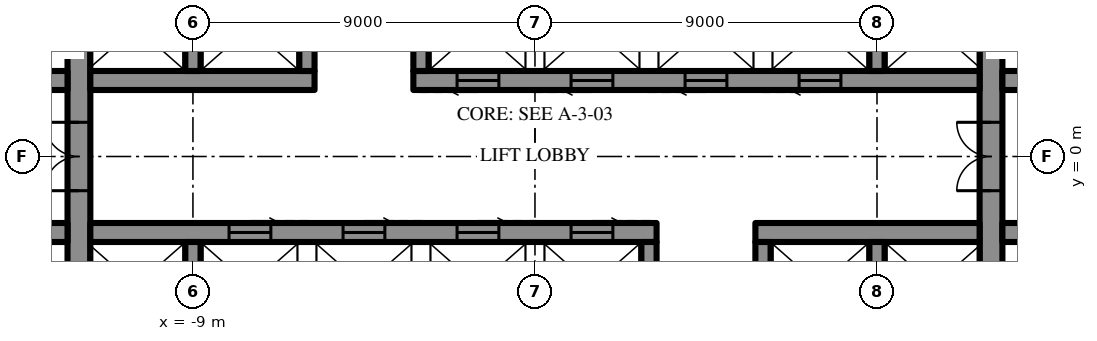
"""IFC4 building model, lengths in metres.
Left out: names, types, materials, properties, quantities, classifications, styles, units other than length and angle.
Written with IfcOpenShell. Run it as: python <this file> out.ifc"""

import sys

from ifc_helpers import new_model, si_unit, direction, frame, frame_2d, origin, place, context, subcontext, project, spatial, rectangle, extrude, element, fill, save


model = new_model("IFC4")
c1 = context("Model", 3, precision=1e-05, world=origin(), true_north=direction((0.0, 1.0)))
c2 = subcontext(c1, "Body", "Model", "MODEL_VIEW")
j1 = project(units=[si_unit("LENGTHUNIT", "METRE"), si_unit("PLANEANGLEUNIT", "RADIAN")], contexts=[c1])
p1 = place(None, origin())
s1 = spatial("IfcSite", under=j1, at=p1, CompositionType="ELEMENT")
p2 = place(p1, origin())
s2 = spatial("IfcBuilding", under=s1, at=p2, CompositionType="ELEMENT")
p3 = place(p2, frame((0.0, 0.0, 274.3)))
s3 = spatial("IfcBuildingStorey", under=s2, at=p3, CompositionType="ELEMENT", Elevation=274.3)
p4 = place(p3, frame((12.0, -10.7, 0.0), z_axis=(0.0, 0.0, 1.0), x_axis=(0.0, 1.0, 0.0)))
e1 = element("IfcWall", 1, at=p4, inside=s3, PredefinedType="SHEAR", context=c2, shape_type="SweptSolid", body=[
    extrude(rectangle(XDim=21.4, YDim=0.6, at=frame_2d((10.7, 0.0))), origin(), (0.0, 0.0, 1.0), 4.2),
])
p5 = place(p4, frame((9.8, 0.0, 0.0)))
e2 = element("IfcOpeningElement", 2, at=p5, cuts=e1, PredefinedType="OPENING", context=c2, shape_type="SweptSolid", body=[
    extrude(rectangle(XDim=1.8, YDim=2.4, at=frame_2d((0.9, 1.2))), frame((0.0, 0.31, 0.0), z_axis=(0.0, -1.0, 0.0), x_axis=(1.0, 0.0, 0.0)), (0.0, 0.0, 1.0), 0.62),
])
p6 = place(p3, frame((-12.0, -10.7, 0.0), z_axis=(0.0, 0.0, 1.0), x_axis=(0.0, 1.0, 0.0)))
e3 = element("IfcWall", 3, at=p6, inside=s3, PredefinedType="SHEAR", context=c2, shape_type="SweptSolid", body=[
    extrude(rectangle(XDim=21.4, YDim=0.6, at=frame_2d((10.7, 0.0))), origin(), (0.0, 0.0, 1.0), 4.2),
])
p7 = place(p6, frame((9.8, 0.0, 0.0)))
e4 = element("IfcOpeningElement", 4, at=p7, cuts=e3, PredefinedType="OPENING", context=c2, shape_type="SweptSolid", body=[
    extrude(rectangle(XDim=1.8, YDim=2.4, at=frame_2d((0.9, 1.2))), frame((0.0, 0.31, 0.0), z_axis=(0.0, -1.0, 0.0), x_axis=(1.0, 0.0, 0.0)), (0.0, 0.0, 1.0), 0.62),
])
p8 = place(p3, frame((-14.5, 2.0, 0.0), z_axis=(0.0, 0.0, 1.0), x_axis=(1.0, 0.0, 0.0)))
e5 = element("IfcWall", 5, at=p8, inside=s3, PredefinedType="SHEAR", context=c2, shape_type="SweptSolid", body=[
    extrude(rectangle(XDim=2.2, YDim=0.5, at=frame_2d((1.1, 0.0))), origin(), (0.0, 0.0, 1.0), 4.2),
])
p9 = place(p8, frame((0.5, 0.0, 0.0)))
e6 = element("IfcOpeningElement", 6, at=p9, cuts=e5, PredefinedType="OPENING", context=c2, shape_type="SweptSolid", body=[
    extrude(rectangle(XDim=0.9, YDim=2.2, at=frame_2d((0.45, 1.1))), frame((0.0, 0.26, 0.0), z_axis=(0.0, -1.0, 0.0), x_axis=(1.0, 0.0, 0.0)), (0.0, 0.0, 1.0), 0.52),
])
p10 = place(p3, frame((-11.7, 2.0, 0.0), z_axis=(0.0, 0.0, 1.0), x_axis=(1.0, 0.0, 0.0)))
e7 = element("IfcWall", 7, at=p10, inside=s3, PredefinedType="SHEAR", context=c2, shape_type="SweptSolid", body=[
    extrude(rectangle(XDim=5.9, YDim=0.5, at=frame_2d((2.95, 0.0))), origin(), (0.0, 0.0, 1.0), 4.2),
])
p11 = place(p3, frame((-3.2, 2.0, 0.0), z_axis=(0.0, 0.0, 1.0), x_axis=(1.0, 0.0, 0.0)))
e8 = element("IfcWall", 8, at=p11, inside=s3, PredefinedType="SHEAR", context=c2, shape_type="SweptSolid", body=[
    extrude(rectangle(XDim=14.9, YDim=0.5, at=frame_2d((7.45, 0.0))), origin(), (0.0, 0.0, 1.0), 4.2),
])
p12 = place(p11, frame((1.15, 0.0, 0.0)))
e9 = element("IfcOpeningElement", 9, at=p12, cuts=e8, PredefinedType="OPENING", context=c2, shape_type="SweptSolid", body=[
    extrude(rectangle(XDim=1.1, YDim=2.2, at=frame_2d((0.55, 1.1))), frame((0.0, 0.26, 0.0), z_axis=(0.0, -1.0, 0.0), x_axis=(1.0, 0.0, 0.0)), (0.0, 0.0, 1.0), 0.52),
])
p13 = place(p11, frame((4.15, 0.0, 0.0)))
e10 = element("IfcOpeningElement", 10, at=p13, cuts=e8, PredefinedType="OPENING", context=c2, shape_type="SweptSolid", body=[
    extrude(rectangle(XDim=1.1, YDim=2.2, at=frame_2d((0.55, 1.1))), frame((0.0, 0.26, 0.0), z_axis=(0.0, -1.0, 0.0), x_axis=(1.0, 0.0, 0.0)), (0.0, 0.0, 1.0), 0.52),
])
p14 = place(p11, frame((7.15, 0.0, 0.0)))
e11 = element("IfcOpeningElement", 11, at=p14, cuts=e8, PredefinedType="OPENING", context=c2, shape_type="SweptSolid", body=[
    extrude(rectangle(XDim=1.1, YDim=2.2, at=frame_2d((0.55, 1.1))), frame((0.0, 0.26, 0.0), z_axis=(0.0, -1.0, 0.0), x_axis=(1.0, 0.0, 0.0)), (0.0, 0.0, 1.0), 0.52),
])
p15 = place(p11, frame((10.15, 0.0, 0.0)))
e12 = element("IfcOpeningElement", 12, at=p15, cuts=e8, PredefinedType="OPENING", context=c2, shape_type="SweptSolid", body=[
    extrude(rectangle(XDim=1.1, YDim=2.2, at=frame_2d((0.55, 1.1))), frame((0.0, 0.26, 0.0), z_axis=(0.0, -1.0, 0.0), x_axis=(1.0, 0.0, 0.0)), (0.0, 0.0, 1.0), 0.52),
])
p16 = place(p3, frame((12.3, 2.0, 0.0), z_axis=(0.0, 0.0, 1.0), x_axis=(1.0, 0.0, 0.0)))
e13 = element("IfcWall", 13, at=p16, inside=s3, PredefinedType="SHEAR", context=c2, shape_type="SweptSolid", body=[
    extrude(rectangle(XDim=2.2, YDim=0.5, at=frame_2d((1.1, 0.0))), origin(), (0.0, 0.0, 1.0), 4.2),
])
p17 = place(p16, frame((0.8, 0.0, 0.0)))
e14 = element("IfcOpeningElement", 14, at=p17, cuts=e13, PredefinedType="OPENING", context=c2, shape_type="SweptSolid", body=[
    extrude(rectangle(XDim=0.9, YDim=2.2, at=frame_2d((0.45, 1.1))), frame((0.0, 0.26, 0.0), z_axis=(0.0, -1.0, 0.0), x_axis=(1.0, 0.0, 0.0)), (0.0, 0.0, 1.0), 0.52),
])
for number, where, z_axis, x_axis in (
    (15, (-9.0, 2.25, 0.0), (0.0, 0.0, 1.0), (0.0, 1.0, 0.0)),
    (16, (-6.0, 2.25, 0.0), (0.0, 0.0, 1.0), (0.0, 1.0, 0.0)),
    (17, (-3.0, 2.25, 0.0), (0.0, 0.0, 1.0), (0.0, 1.0, 0.0)),
    (18, (9.0, 2.25, 0.0), (0.0, 0.0, 1.0), (0.0, 1.0, 0.0)),
):
    element("IfcWall", number, at=place(p3, frame(where, z_axis=z_axis, x_axis=x_axis)), inside=s3, PredefinedType="SHEAR", context=c2, shape_type="SweptSolid", body=[
        extrude(rectangle(XDim=2.3, YDim=0.4, at=frame_2d((1.15, 0.0))), origin(), (0.0, 0.0, 1.0), 4.2),
    ])
p18 = place(p3, frame((14.5, -2.0, 0.0), z_axis=(0.0, 0.0, 1.0), x_axis=(-1.0, 0.0, 0.0)))
e19 = element("IfcWall", 19, at=p18, inside=s3, PredefinedType="SHEAR", context=c2, shape_type="SweptSolid", body=[
    extrude(rectangle(XDim=2.2, YDim=0.5, at=frame_2d((1.1, 0.0))), origin(), (0.0, 0.0, 1.0), 4.2),
])
p19 = place(p18, frame((0.5, 0.0, 0.0)))
e20 = element("IfcOpeningElement", 20, at=p19, cuts=e19, PredefinedType="OPENING", context=c2, shape_type="SweptSolid", body=[
    extrude(rectangle(XDim=0.9, YDim=2.2, at=frame_2d((0.45, 1.1))), frame((0.0, 0.26, 0.0), z_axis=(0.0, -1.0, 0.0), x_axis=(1.0, 0.0, 0.0)), (0.0, 0.0, 1.0), 0.52),
])
p20 = place(p3, frame((11.7, -2.0, 0.0), z_axis=(0.0, 0.0, 1.0), x_axis=(-1.0, 0.0, 0.0)))
e21 = element("IfcWall", 21, at=p20, inside=s3, PredefinedType="SHEAR", context=c2, shape_type="SweptSolid", body=[
    extrude(rectangle(XDim=5.9, YDim=0.5, at=frame_2d((2.95, 0.0))), origin(), (0.0, 0.0, 1.0), 4.2),
])
p21 = place(p3, frame((3.2, -2.0, 0.0), z_axis=(0.0, 0.0, 1.0), x_axis=(-1.0, 0.0, 0.0)))
e22 = element("IfcWall", 22, at=p21, inside=s3, PredefinedType="SHEAR", context=c2, shape_type="SweptSolid", body=[
    extrude(rectangle(XDim=14.9, YDim=0.5, at=frame_2d((7.45, 0.0))), origin(), (0.0, 0.0, 1.0), 4.2),
])
p22 = place(p21, frame((1.15, 0.0, 0.0)))
e23 = element("IfcOpeningElement", 23, at=p22, cuts=e22, PredefinedType="OPENING", context=c2, shape_type="SweptSolid", body=[
    extrude(rectangle(XDim=1.1, YDim=2.2, at=frame_2d((0.55, 1.1))), frame((0.0, 0.26, 0.0), z_axis=(0.0, -1.0, 0.0), x_axis=(1.0, 0.0, 0.0)), (0.0, 0.0, 1.0), 0.52),
])
p23 = place(p21, frame((4.15, 0.0, 0.0)))
e24 = element("IfcOpeningElement", 24, at=p23, cuts=e22, PredefinedType="OPENING", context=c2, shape_type="SweptSolid", body=[
    extrude(rectangle(XDim=1.1, YDim=2.2, at=frame_2d((0.55, 1.1))), frame((0.0, 0.26, 0.0), z_axis=(0.0, -1.0, 0.0), x_axis=(1.0, 0.0, 0.0)), (0.0, 0.0, 1.0), 0.52),
])
p24 = place(p21, frame((7.15, 0.0, 0.0)))
e25 = element("IfcOpeningElement", 25, at=p24, cuts=e22, PredefinedType="OPENING", context=c2, shape_type="SweptSolid", body=[
    extrude(rectangle(XDim=1.1, YDim=2.2, at=frame_2d((0.55, 1.1))), frame((0.0, 0.26, 0.0), z_axis=(0.0, -1.0, 0.0), x_axis=(1.0, 0.0, 0.0)), (0.0, 0.0, 1.0), 0.52),
])
p25 = place(p21, frame((10.15, 0.0, 0.0)))
e26 = element("IfcOpeningElement", 26, at=p25, cuts=e22, PredefinedType="OPENING", context=c2, shape_type="SweptSolid", body=[
    extrude(rectangle(XDim=1.1, YDim=2.2, at=frame_2d((0.55, 1.1))), frame((0.0, 0.26, 0.0), z_axis=(0.0, -1.0, 0.0), x_axis=(1.0, 0.0, 0.0)), (0.0, 0.0, 1.0), 0.52),
])
p26 = place(p3, frame((-12.3, -2.0, 0.0), z_axis=(0.0, 0.0, 1.0), x_axis=(-1.0, 0.0, 0.0)))
e27 = element("IfcWall", 27, at=p26, inside=s3, PredefinedType="SHEAR", context=c2, shape_type="SweptSolid", body=[
    extrude(rectangle(XDim=2.2, YDim=0.5, at=frame_2d((1.1, 0.0))), origin(), (0.0, 0.0, 1.0), 4.2),
])
p27 = place(p26, frame((0.8, 0.0, 0.0)))
e28 = element("IfcOpeningElement", 28, at=p27, cuts=e27, PredefinedType="OPENING", context=c2, shape_type="SweptSolid", body=[
    extrude(rectangle(XDim=0.9, YDim=2.2, at=frame_2d((0.45, 1.1))), frame((0.0, 0.26, 0.0), z_axis=(0.0, -1.0, 0.0), x_axis=(1.0, 0.0, 0.0)), (0.0, 0.0, 1.0), 0.52),
])
for number, where, z_axis, x_axis in (
    (29, (9.0, -2.25, 0.0), (0.0, 0.0, 1.0), (0.0, -1.0, 0.0)),
    (30, (6.0, -2.25, 0.0), (0.0, 0.0, 1.0), (0.0, -1.0, 0.0)),
    (31, (3.0, -2.25, 0.0), (0.0, 0.0, 1.0), (0.0, -1.0, 0.0)),
    (32, (-9.0, -2.25, 0.0), (0.0, 0.0, 1.0), (0.0, -1.0, 0.0)),
):
    element("IfcWall", number, at=place(p3, frame(where, z_axis=z_axis, x_axis=x_axis)), inside=s3, PredefinedType="SHEAR", context=c2, shape_type="SweptSolid", body=[
        extrude(rectangle(XDim=2.3, YDim=0.4, at=frame_2d((1.15, 0.0))), origin(), (0.0, 0.0, 1.0), 4.2),
    ])
p28 = place(p5, origin())
e33 = element("IfcDoor", 33, at=p28, inside=s3, OperationType="DOUBLE_DOOR_SINGLE_SWING", PredefinedType="DOOR", context=c2, shape_type="SweptSolid", body=[
    extrude(rectangle(XDim=1.8, YDim=2.4, at=frame_2d((0.9, 1.2))), frame((0.0, 0.025, 0.0), z_axis=(0.0, -1.0, 0.0), x_axis=(1.0, 0.0, 0.0)), (0.0, 0.0, 1.0), 0.05),
])
fill(e2, e33)
p29 = place(p7, origin())
e34 = element("IfcDoor", 34, at=p29, inside=s3, OperationType="DOUBLE_DOOR_SINGLE_SWING", PredefinedType="DOOR", context=c2, shape_type="SweptSolid", body=[
    extrude(rectangle(XDim=1.8, YDim=2.4, at=frame_2d((0.9, 1.2))), frame((0.0, 0.025, 0.0), z_axis=(0.0, -1.0, 0.0), x_axis=(1.0, 0.0, 0.0)), (0.0, 0.0, 1.0), 0.05),
])
fill(e4, e34)
p30 = place(p12, frame((1.1, 0.0, 0.0), z_axis=(0.0, 0.0, 1.0), x_axis=(-1.0, 0.0, 0.0)))
e35 = element("IfcDoor", 35, at=p30, inside=s3, OperationType="SLIDING_TO_LEFT", PredefinedType="DOOR", context=c2, shape_type="SweptSolid", body=[
    extrude(rectangle(XDim=1.1, YDim=2.2, at=frame_2d((0.55, 1.1))), frame((0.0, 0.025, 0.0), z_axis=(0.0, -1.0, 0.0), x_axis=(1.0, 0.0, 0.0)), (0.0, 0.0, 1.0), 0.05),
])
fill(e9, e35)
p31 = place(p13, frame((1.1, 0.0, 0.0), z_axis=(0.0, 0.0, 1.0), x_axis=(-1.0, 0.0, 0.0)))
e36 = element("IfcDoor", 36, at=p31, inside=s3, OperationType="SLIDING_TO_LEFT", PredefinedType="DOOR", context=c2, shape_type="SweptSolid", body=[
    extrude(rectangle(XDim=1.1, YDim=2.2, at=frame_2d((0.55, 1.1))), frame((0.0, 0.025, 0.0), z_axis=(0.0, -1.0, 0.0), x_axis=(1.0, 0.0, 0.0)), (0.0, 0.0, 1.0), 0.05),
])
fill(e10, e36)
p32 = place(p14, frame((1.1, 0.0, 0.0), z_axis=(0.0, 0.0, 1.0), x_axis=(-1.0, 0.0, 0.0)))
e37 = element("IfcDoor", 37, at=p32, inside=s3, OperationType="SLIDING_TO_LEFT", PredefinedType="DOOR", context=c2, shape_type="SweptSolid", body=[
    extrude(rectangle(XDim=1.1, YDim=2.2, at=frame_2d((0.55, 1.1))), frame((0.0, 0.025, 0.0), z_axis=(0.0, -1.0, 0.0), x_axis=(1.0, 0.0, 0.0)), (0.0, 0.0, 1.0), 0.05),
])
fill(e11, e37)
p33 = place(p15, frame((1.1, 0.0, 0.0), z_axis=(0.0, 0.0, 1.0), x_axis=(-1.0, 0.0, 0.0)))
e38 = element("IfcDoor", 38, at=p33, inside=s3, OperationType="SLIDING_TO_LEFT", PredefinedType="DOOR", context=c2, shape_type="SweptSolid", body=[
    extrude(rectangle(XDim=1.1, YDim=2.2, at=frame_2d((0.55, 1.1))), frame((0.0, 0.025, 0.0), z_axis=(0.0, -1.0, 0.0), x_axis=(1.0, 0.0, 0.0)), (0.0, 0.0, 1.0), 0.05),
])
fill(e12, e38)
p34 = place(p22, frame((1.1, 0.0, 0.0), z_axis=(0.0, 0.0, 1.0), x_axis=(-1.0, 0.0, 0.0)))
e39 = element("IfcDoor", 39, at=p34, inside=s3, OperationType="SLIDING_TO_LEFT", PredefinedType="DOOR", context=c2, shape_type="SweptSolid", body=[
    extrude(rectangle(XDim=1.1, YDim=2.2, at=frame_2d((0.55, 1.1))), frame((0.0, 0.025, 0.0), z_axis=(0.0, -1.0, 0.0), x_axis=(1.0, 0.0, 0.0)), (0.0, 0.0, 1.0), 0.05),
])
fill(e23, e39)
p35 = place(p23, frame((1.1, 0.0, 0.0), z_axis=(0.0, 0.0, 1.0), x_axis=(-1.0, 0.0, 0.0)))
e40 = element("IfcDoor", 40, at=p35, inside=s3, OperationType="SLIDING_TO_LEFT", PredefinedType="DOOR", context=c2, shape_type="SweptSolid", body=[
    extrude(rectangle(XDim=1.1, YDim=2.2, at=frame_2d((0.55, 1.1))), frame((0.0, 0.025, 0.0), z_axis=(0.0, -1.0, 0.0), x_axis=(1.0, 0.0, 0.0)), (0.0, 0.0, 1.0), 0.05),
])
fill(e24, e40)
p36 = place(p24, frame((1.1, 0.0, 0.0), z_axis=(0.0, 0.0, 1.0), x_axis=(-1.0, 0.0, 0.0)))
e41 = element("IfcDoor", 41, at=p36, inside=s3, OperationType="SLIDING_TO_LEFT", PredefinedType="DOOR", context=c2, shape_type="SweptSolid", body=[
    extrude(rectangle(XDim=1.1, YDim=2.2, at=frame_2d((0.55, 1.1))), frame((0.0, 0.025, 0.0), z_axis=(0.0, -1.0, 0.0), x_axis=(1.0, 0.0, 0.0)), (0.0, 0.0, 1.0), 0.05),
])
fill(e25, e41)
p37 = place(p25, frame((1.1, 0.0, 0.0), z_axis=(0.0, 0.0, 1.0), x_axis=(-1.0, 0.0, 0.0)))
e42 = element("IfcDoor", 42, at=p37, inside=s3, OperationType="SLIDING_TO_LEFT", PredefinedType="DOOR", context=c2, shape_type="SweptSolid", body=[
    extrude(rectangle(XDim=1.1, YDim=2.2, at=frame_2d((0.55, 1.1))), frame((0.0, 0.025, 0.0), z_axis=(0.0, -1.0, 0.0), x_axis=(1.0, 0.0, 0.0)), (0.0, 0.0, 1.0), 0.05),
])
fill(e26, e42)
save(model, sys.argv[1])
